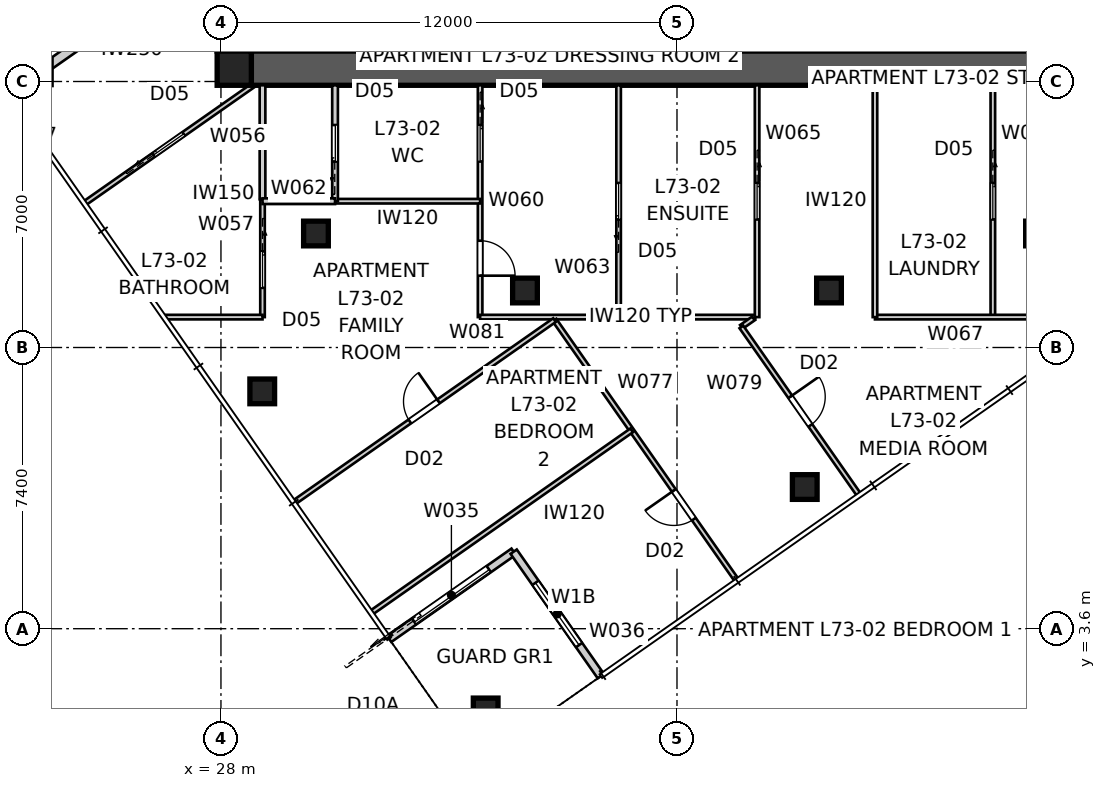
"""IFC4 building model, lengths in metres.
Left out: names, types, materials, properties, quantities, classifications, styles, units other than length and angle.
Written with IfcOpenShell. Run it as: python <this file> out.ifc"""

import sys

from ifc_helpers import new_model, si_unit, direction, frame, frame_2d, origin, origin_2d, place, context, subcontext, project, spatial, polyline, rectangle, outline, extrude, element, fill, save


model = new_model("IFC4")
c1 = context("Model", 3, precision=1e-05, world=origin(), true_north=direction((0.0, 1.0)))
c2 = subcontext(c1, "Body", "Model", "MODEL_VIEW")
j1 = project(units=[si_unit("LENGTHUNIT", "METRE"), si_unit("PLANEANGLEUNIT", "RADIAN")], contexts=[c1])
p1 = place(None, origin())
s1 = spatial("IfcSite", under=j1, at=p1, CompositionType="ELEMENT")
p2 = place(p1, origin())
s2 = spatial("IfcBuilding", under=s1, at=p2, CompositionType="ELEMENT")
p3 = place(p2, frame((0.0, 0.0, 264.2)))
s3 = spatial("IfcBuildingStorey", under=s2, at=p3, CompositionType="ELEMENT", Elevation=264.2)
p4 = place(p3, frame((51.2, 18.35, 0.0), z_axis=(0.0, 0.0, 1.0), x_axis=(-1.0, 0.0, 0.0)))
e1 = element("IfcWall", 1, at=p4, inside=s3, PredefinedType="SHEAR", context=c2, shape_type="SweptSolid", body=[
    extrude(outline(polyline([(0.0, -0.45), (22.4, -0.45), (22.4, -0.025), (22.85, -0.025), (22.85, 0.025), (22.4, 0.025), (22.4, 0.45), (0.0, 0.45), (0.0, 0.025), (-0.45, 0.025), (-0.45, -0.025), (0.0, -0.025), (0.0, -0.45)])), origin(), (0.0, 0.0, 1.0), 3.4),
])
p5 = place(p3, frame((28.35, 41.2, 0.0), z_axis=(0.0, 0.0, 1.0), x_axis=(0.0, -1.0, 0.0)))
e2 = element("IfcWall", 2, at=p5, inside=s3, PredefinedType="SHEAR", context=c2, shape_type="SweptSolid", body=[
    extrude(outline(polyline([(0.0, -0.45), (22.4, -0.45), (22.4, -0.025), (22.85, -0.025), (22.85, 0.025), (22.4, 0.025), (22.4, 0.45), (0.0, 0.45), (0.0, 0.025), (-0.45, 0.025), (-0.45, -0.025), (0.0, -0.025), (0.0, -0.45)])), origin(), (0.0, 0.0, 1.0), 3.4),
])
p6 = place(p5, frame((11.14, 0.0, 0.0)))
e3 = element("IfcOpeningElement", 3, at=p6, cuts=e2, PredefinedType="OPENING", context=c2, shape_type="SweptSolid", body=[
    extrude(rectangle(XDim=1.02, YDim=2.4, at=frame_2d((0.51, 1.2))), frame((0.0, 0.46, 0.0), z_axis=(0.0, -1.0, 0.0), x_axis=(1.0, 0.0, 0.0)), (0.0, 0.0, 1.0), 0.92),
])
p7 = place(p3, frame((28.35, 18.35, 0.0), z_axis=(0.0, 0.0, 1.0), x_axis=(1.0, 0.0, 0.0)))
e4 = element("IfcColumn", 4, at=p7, inside=s3, PredefinedType="COLUMN", context=c2, shape_type="SweptSolid", body=[
    extrude(rectangle(XDim=0.9, YDim=0.9, at=origin_2d()), origin(), (0.0, 0.0, 1.0), 3.4),
])
for number, where, z_axis, x_axis in (
    (5, (34.966, 1.449, 0.0), (0.0, 0.0, 1.0), (1.0, 0.0, 0.0)),
    (6, (43.362, 7.328, 0.0), (0.0, 0.0, 1.0), (1.0, 0.0, 0.0)),
    (7, (29.086, 9.845, 0.0), (0.0, 0.0, 1.0), (1.0, 0.0, 0.0)),
):
    element("IfcColumn", number, at=place(p3, frame(where, z_axis=z_axis, x_axis=x_axis)), inside=s3, PredefinedType="COLUMN", context=c2, shape_type="SweptSolid", body=[
        extrude(rectangle(XDim=0.65, YDim=0.65, at=origin_2d()), origin(), (0.0, 0.0, 1.0), 3.2),
    ])
for number, where, z_axis, x_axis in (
    (8, (30.5, 14.0, 0.0), (0.0, 0.0, 1.0), (1.0, 0.0, 0.0)),
    (9, (36.0, 12.5, 0.0), (0.0, 0.0, 1.0), (1.0, 0.0, 0.0)),
    (10, (44.0, 12.5, 0.0), (0.0, 0.0, 1.0), (1.0, 0.0, 0.0)),
    (11, (49.5, 14.0, 0.0), (0.0, 0.0, 1.0), (1.0, 0.0, 0.0)),
):
    element("IfcColumn", number, at=place(p3, frame(where, z_axis=z_axis, x_axis=x_axis)), inside=s3, PredefinedType="COLUMN", context=c2, shape_type="SweptSolid", body=[
        extrude(rectangle(XDim=0.65, YDim=0.65, at=origin_2d()), origin(), (0.0, 0.0, 1.0), 3.4),
    ])
p8 = place(p3, frame((32.426, 3.333, 0.0), z_axis=(0.0, 0.0, 1.0), x_axis=(0.819165963305, 0.573556557423, 0.0)))
e12 = element("IfcWall", 12, at=p8, inside=s3, PredefinedType="SOLIDWALL", context=c2, shape_type="SweptSolid", body=[
    extrude(rectangle(XDim=4.0, YDim=0.2, at=frame_2d((2.0, 0.0))), origin(), (0.0, 0.0, 1.0), 3.2),
])
p9 = place(p8, frame((0.8, 0.0, 0.0)))
e13 = element("IfcOpeningElement", 13, at=p9, cuts=e12, PredefinedType="OPENING", context=c2, shape_type="SweptSolid", body=[
    extrude(rectangle(XDim=2.4, YDim=2.1, at=frame_2d((1.2, 1.05))), frame((0.0, 0.11, 0.0), z_axis=(0.0, -1.0, 0.0), x_axis=(1.0, 0.0, 0.0)), (0.0, 0.0, 1.0), 0.22),
])
p10 = place(p3, frame((35.702, 5.627, 0.0), z_axis=(0.0, 0.0, 1.0), x_axis=(0.573597512525, -0.819137286189, 0.0)))
e14 = element("IfcWall", 14, at=p10, inside=s3, PredefinedType="SOLIDWALL", context=c2, shape_type="SweptSolid", body=[
    extrude(rectangle(XDim=4.0, YDim=0.2, at=frame_2d((2.0, 0.0))), origin(), (0.0, 0.0, 1.0), 3.2),
])
p11 = place(p10, frame((1.0, 0.0, 0.4)))
e15 = element("IfcOpeningElement", 15, at=p11, cuts=e14, PredefinedType="OPENING", context=c2, shape_type="SweptSolid", body=[
    extrude(rectangle(XDim=2.0, YDim=1.8, at=frame_2d((1.0, 0.9))), frame((0.0, 0.11, 0.0), z_axis=(0.0, -1.0, 0.0), x_axis=(1.0, 0.0, 0.0)), (0.0, 0.0, 1.0), 0.22),
])
p12 = place(p3, frame((22.388, 17.668, 0.0), z_axis=(0.0, 0.0, 1.0), x_axis=(0.819161528122, 0.573562891796, 0.0)))
e16 = element("IfcWall", 16, at=p12, inside=s3, PredefinedType="PARTITIONING", context=c2, shape_type="SweptSolid", body=[
    extrude(rectangle(XDim=6.681, YDim=0.25, at=frame_2d((3.341, 0.0))), origin(), (0.0, 0.0, 1.0), 3.2),
])
p13 = place(p3, frame((24.437, 14.812, 0.0), z_axis=(0.0, 0.0, 1.0), x_axis=(0.819157353031, 0.573568854608, 0.0)))
e17 = element("IfcWall", 17, at=p13, inside=s3, PredefinedType="PARTITIONING", context=c2, shape_type="SweptSolid", body=[
    extrude(rectangle(XDim=5.384, YDim=0.12, at=frame_2d((2.692, 0.0))), origin(), (0.0, 0.0, 1.0), 3.2),
])
p14 = place(p13, frame((2.192, 0.0, 0.0)))
e18 = element("IfcOpeningElement", 18, at=p14, cuts=e17, PredefinedType="OPENING", context=c2, shape_type="SweptSolid", body=[
    extrude(rectangle(XDim=0.96, YDim=2.1, at=frame_2d((0.48, 1.05))), frame((0.0, 0.07, 0.0), z_axis=(0.0, -1.0, 0.0), x_axis=(1.0, 0.0, 0.0)), (0.0, 0.0, 1.0), 0.14),
])
p15 = place(p3, frame((29.094, 14.9, 0.0), z_axis=(0.0, 0.0, 1.0), x_axis=(0.0, -1.0, 0.0)))
e19 = element("IfcWall", 19, at=p15, inside=s3, PredefinedType="PARTITIONING", context=c2, shape_type="SweptSolid", body=[
    extrude(rectangle(XDim=3.1, YDim=0.12, at=frame_2d((1.55, 0.0))), origin(), (0.0, 0.0, 1.0), 3.2),
])
p16 = place(p15, frame((1.37, 0.0, 0.0)))
e20 = element("IfcOpeningElement", 20, at=p16, cuts=e19, PredefinedType="OPENING", context=c2, shape_type="SweptSolid", body=[
    extrude(rectangle(XDim=0.96, YDim=2.1, at=frame_2d((0.48, 1.05))), frame((0.0, 0.07, 0.0), z_axis=(0.0, -1.0, 0.0), x_axis=(1.0, 0.0, 0.0)), (0.0, 0.0, 1.0), 0.14),
])
p17 = place(p3, frame((29.094, 11.8, 0.0), z_axis=(0.0, 0.0, 1.0), x_axis=(-1.0, 0.0, 0.0)))
e21 = element("IfcWall", 21, at=p17, inside=s3, PredefinedType="PARTITIONING", context=c2, shape_type="SweptSolid", body=[
    extrude(rectangle(XDim=2.548, YDim=0.12, at=frame_2d((1.274, 0.0))), origin(), (0.0, 0.0, 1.0), 3.2),
])
p18 = place(p3, frame((29.094, 17.9, 0.0), z_axis=(0.0, 0.0, 1.0), x_axis=(0.0, -1.0, 0.0)))
e22 = element("IfcWall", 22, at=p18, inside=s3, PredefinedType="SOLIDWALL", context=c2, shape_type="SweptSolid", body=[
    extrude(rectangle(XDim=3.0, YDim=0.15, at=frame_2d((1.5, 0.0))), origin(), (0.0, 0.0, 1.0), 3.2),
])
p19 = place(p3, frame((34.819, 17.9, 0.0), z_axis=(0.0, 0.0, 1.0), x_axis=(0.0, -1.0, 0.0)))
e23 = element("IfcWall", 23, at=p19, inside=s3, PredefinedType="PARTITIONING", context=c2, shape_type="SweptSolid", body=[
    extrude(rectangle(XDim=6.1, YDim=0.12, at=frame_2d((3.05, 0.0))), origin(), (0.0, 0.0, 1.0), 3.2),
])
p20 = place(p19, frame((4.09, 0.0, 0.0)))
e24 = element("IfcOpeningElement", 24, at=p20, cuts=e23, PredefinedType="OPENING", context=c2, shape_type="SweptSolid", body=[
    extrude(rectangle(XDim=0.92, YDim=2.1, at=frame_2d((0.46, 1.05))), frame((0.0, 0.07, 0.0), z_axis=(0.0, -1.0, 0.0), x_axis=(1.0, 0.0, 0.0)), (0.0, 0.0, 1.0), 0.14),
])
p21 = place(p19, frame((1.045, 0.0, 0.0)))
e25 = element("IfcOpeningElement", 25, at=p21, cuts=e23, PredefinedType="OPENING", context=c2, shape_type="SweptSolid", body=[
    extrude(rectangle(XDim=0.96, YDim=2.1, at=frame_2d((0.48, 1.05))), frame((0.0, 0.07, 0.0), z_axis=(0.0, -1.0, 0.0), x_axis=(1.0, 0.0, 0.0)), (0.0, 0.0, 1.0), 0.14),
])
p22 = place(p3, frame((34.819, 14.85, 0.0), z_axis=(0.0, 0.0, 1.0), x_axis=(-1.0, 0.0, 0.0)))
e26 = element("IfcWall", 26, at=p22, inside=s3, PredefinedType="PARTITIONING", context=c2, shape_type="SweptSolid", body=[
    extrude(rectangle(XDim=3.817, YDim=0.12, at=frame_2d((1.909, 0.0))), origin(), (0.0, 0.0, 1.0), 3.2),
])
p23 = place(p3, frame((31.002, 14.85, 0.0), z_axis=(0.0, 0.0, 1.0), x_axis=(0.0, 1.0, 0.0)))
e27 = element("IfcWall", 27, at=p23, inside=s3, PredefinedType="SOLIDWALL", context=c2, shape_type="SweptSolid", body=[
    extrude(rectangle(XDim=3.05, YDim=0.15, at=frame_2d((1.525, 0.0))), origin(), (0.0, 0.0, 1.0), 3.2),
])
p24 = place(p23, frame((1.045, 0.0, 0.0)))
e28 = element("IfcOpeningElement", 28, at=p24, cuts=e27, PredefinedType="OPENING", context=c2, shape_type="SweptSolid", body=[
    extrude(rectangle(XDim=0.96, YDim=2.1, at=frame_2d((0.48, 1.05))), frame((0.0, 0.085, 0.0), z_axis=(0.0, -1.0, 0.0), x_axis=(1.0, 0.0, 0.0)), (0.0, 0.0, 1.0), 0.17),
])
p25 = place(p3, frame((38.464, 11.8, 0.0), z_axis=(0.0, 0.0, 1.0), x_axis=(0.0, 1.0, 0.0)))
e29 = element("IfcWall", 29, at=p25, inside=s3, PredefinedType="PARTITIONING", context=c2, shape_type="SweptSolid", body=[
    extrude(rectangle(XDim=6.1, YDim=0.12, at=frame_2d((3.05, 0.0))), origin(), (0.0, 0.0, 1.0), 3.2),
])
p26 = place(p25, frame((2.57, 0.0, 0.0)))
e30 = element("IfcOpeningElement", 30, at=p26, cuts=e29, PredefinedType="OPENING", context=c2, shape_type="SweptSolid", body=[
    extrude(rectangle(XDim=0.96, YDim=2.1, at=frame_2d((0.48, 1.05))), frame((0.0, 0.07, 0.0), z_axis=(0.0, -1.0, 0.0), x_axis=(1.0, 0.0, 0.0)), (0.0, 0.0, 1.0), 0.14),
])
p27 = place(p3, frame((42.062, 11.8, 0.0), z_axis=(0.0, 0.0, 1.0), x_axis=(-1.0, 0.0, 0.0)))
e31 = element("IfcWall", 31, at=p27, inside=s3, PredefinedType="PARTITIONING", context=c2, shape_type="SweptSolid", body=[
    extrude(rectangle(XDim=7.243, YDim=0.12, at=frame_2d((3.621, 0.0))), origin(), (0.0, 0.0, 1.0), 3.2),
])
p28 = place(p3, frame((42.108, 17.9, 0.0), z_axis=(0.0, 0.0, 1.0), x_axis=(0.0, -1.0, 0.0)))
e32 = element("IfcWall", 32, at=p28, inside=s3, PredefinedType="PARTITIONING", context=c2, shape_type="SweptSolid", body=[
    extrude(rectangle(XDim=6.1, YDim=0.12, at=frame_2d((3.05, 0.0))), origin(), (0.0, 0.0, 1.0), 3.2),
])
p29 = place(p28, frame((2.57, 0.0, 0.0)))
e33 = element("IfcOpeningElement", 33, at=p29, cuts=e32, PredefinedType="OPENING", context=c2, shape_type="SweptSolid", body=[
    extrude(rectangle(XDim=0.96, YDim=2.1, at=frame_2d((0.48, 1.05))), frame((0.0, 0.07, 0.0), z_axis=(0.0, -1.0, 0.0), x_axis=(1.0, 0.0, 0.0)), (0.0, 0.0, 1.0), 0.14),
])
p30 = place(p3, frame((48.311, 17.9, 0.0), z_axis=(0.0, 0.0, 1.0), x_axis=(0.0, -1.0, 0.0)))
e34 = element("IfcWall", 34, at=p30, inside=s3, PredefinedType="PARTITIONING", context=c2, shape_type="SweptSolid", body=[
    extrude(rectangle(XDim=6.1, YDim=0.12, at=frame_2d((3.05, 0.0))), origin(), (0.0, 0.0, 1.0), 3.2),
])
p31 = place(p30, frame((2.57, 0.0, 0.0)))
e35 = element("IfcOpeningElement", 35, at=p31, cuts=e34, PredefinedType="OPENING", context=c2, shape_type="SweptSolid", body=[
    extrude(rectangle(XDim=0.96, YDim=2.1, at=frame_2d((0.48, 1.05))), frame((0.0, 0.07, 0.0), z_axis=(0.0, -1.0, 0.0), x_axis=(1.0, 0.0, 0.0)), (0.0, 0.0, 1.0), 0.14),
])
p32 = place(p3, frame((51.422, 11.8, 0.0), z_axis=(0.0, 0.0, 1.0), x_axis=(-1.0, 0.0, 0.0)))
e36 = element("IfcWall", 36, at=p32, inside=s3, PredefinedType="PARTITIONING", context=c2, shape_type="SweptSolid", body=[
    extrude(rectangle(XDim=6.213, YDim=0.12, at=frame_2d((3.106, 0.0))), origin(), (0.0, 0.0, 1.0), 3.2),
])
p33 = place(p32, frame((1.061, 0.0, 0.0)))
e37 = element("IfcOpeningElement", 37, at=p33, cuts=e36, PredefinedType="OPENING", context=c2, shape_type="SweptSolid", body=[
    extrude(rectangle(XDim=0.92, YDim=2.1, at=frame_2d((0.46, 1.05))), frame((0.0, 0.07, 0.0), z_axis=(0.0, -1.0, 0.0), x_axis=(1.0, 0.0, 0.0)), (0.0, 0.0, 1.0), 0.14),
])
p34 = place(p3, frame((45.209, 11.8, 0.0), z_axis=(0.0, 0.0, 1.0), x_axis=(0.0, 1.0, 0.0)))
e38 = element("IfcWall", 38, at=p34, inside=s3, PredefinedType="PARTITIONING", context=c2, shape_type="SweptSolid", body=[
    extrude(rectangle(XDim=6.1, YDim=0.12, at=frame_2d((3.05, 0.0))), origin(), (0.0, 0.0, 1.0), 3.2),
])
p35 = place(p3, frame((41.558, 4.893, 0.0), z_axis=(0.0, 0.0, 1.0), x_axis=(-0.573576357466, 0.819152099525, 0.0)))
e39 = element("IfcWall", 39, at=p35, inside=s3, PredefinedType="PARTITIONING", context=c2, shape_type="SweptSolid", body=[
    extrude(rectangle(XDim=8.335, YDim=0.12, at=frame_2d((4.167, 0.0))), origin(), (0.0, 0.0, 1.0), 3.2),
])
p36 = place(p35, frame((1.942, 0.0, 0.0)))
e40 = element("IfcOpeningElement", 40, at=p36, cuts=e39, PredefinedType="OPENING", context=c2, shape_type="SweptSolid", body=[
    extrude(rectangle(XDim=0.92, YDim=2.34, at=frame_2d((0.46, 1.17))), frame((0.0, 0.07, 0.0), z_axis=(0.0, -1.0, 0.0), x_axis=(1.0, 0.0, 0.0)), (0.0, 0.0, 1.0), 0.14),
])
p37 = place(p3, frame((42.012, 11.765, 0.0), z_axis=(0.0, 0.0, 1.0), x_axis=(-0.819379381292, -0.573251628444, 0.0)))
e41 = element("IfcWall", 41, at=p37, inside=s3, PredefinedType="PARTITIONING", context=c2, shape_type="SweptSolid", body=[
    extrude(rectangle(XDim=0.389, YDim=0.12, at=frame_2d((0.194, 0.0))), origin(), (0.0, 0.0, 1.0), 3.2),
])
p38 = place(p3, frame((41.693, 11.542, 0.0), z_axis=(0.0, 0.0, 1.0), x_axis=(0.573560001964, -0.819163551525, 0.0)))
e42 = element("IfcWall", 42, at=p38, inside=s3, PredefinedType="PARTITIONING", context=c2, shape_type="SweptSolid", body=[
    extrude(rectangle(XDim=5.369, YDim=0.12, at=frame_2d((2.685, 0.0))), origin(), (0.0, 0.0, 1.0), 3.2),
])
p39 = place(p38, frame((2.244, 0.0, 0.0)))
e43 = element("IfcOpeningElement", 43, at=p39, cuts=e42, PredefinedType="OPENING", context=c2, shape_type="SweptSolid", body=[
    extrude(rectangle(XDim=0.92, YDim=2.34, at=frame_2d((0.46, 1.17))), frame((0.0, 0.07, 0.0), z_axis=(0.0, -1.0, 0.0), x_axis=(1.0, 0.0, 0.0)), (0.0, 0.0, 1.0), 0.14),
])
p40 = place(p3, frame((38.808, 8.82, 0.0), z_axis=(0.0, 0.0, 1.0), x_axis=(-0.819152099525, -0.573576357466, 0.0)))
e44 = element("IfcWall", 44, at=p40, inside=s3, PredefinedType="PARTITIONING", context=c2, shape_type="SweptSolid", body=[
    extrude(rectangle(XDim=8.335, YDim=0.12, at=frame_2d((4.167, 0.0))), origin(), (0.0, 0.0, 1.0), 3.2),
])
p41 = place(p3, frame((29.949, 6.94, 0.0), z_axis=(0.0, 0.0, 1.0), x_axis=(0.819152099525, 0.573576357466, 0.0)))
e45 = element("IfcWall", 45, at=p41, inside=s3, PredefinedType="PARTITIONING", context=c2, shape_type="SweptSolid", body=[
    extrude(rectangle(XDim=8.335, YDim=0.12, at=frame_2d((4.167, 0.0))), origin(), (0.0, 0.0, 1.0), 3.2),
])
p42 = place(p41, frame((3.688, 0.0, 0.0)))
e46 = element("IfcOpeningElement", 46, at=p42, cuts=e45, PredefinedType="OPENING", context=c2, shape_type="SweptSolid", body=[
    extrude(rectangle(XDim=0.92, YDim=2.34, at=frame_2d((0.46, 1.17))), frame((0.0, 0.07, 0.0), z_axis=(0.0, -1.0, 0.0), x_axis=(1.0, 0.0, 0.0)), (0.0, 0.0, 1.0), 0.14),
])
p43 = place(p3, frame((29.094, 14.85, 0.0), z_axis=(0.0, 0.0, 1.0), x_axis=(1.0, 0.0, 0.0)))
e47 = element("IfcWall", 47, at=p43, inside=s3, PredefinedType="SOLIDWALL", context=c2, shape_type="SweptSolid", body=[
    extrude(rectangle(XDim=1.909, YDim=0.15, at=frame_2d((0.954, 0.0))), origin(), (0.0, 0.0, 1.0), 3.2),
])
p44 = place(p9, origin())
e48 = element("IfcDoor", 48, at=p44, inside=s3, OperationType="SLIDING_TO_LEFT", PredefinedType="DOOR", context=c2, shape_type="SweptSolid", body=[
    extrude(rectangle(XDim=2.4, YDim=2.1, at=frame_2d((1.2, 1.05))), frame((0.0, 0.025, 0.0), z_axis=(0.0, -1.0, 0.0), x_axis=(1.0, 0.0, 0.0)), (0.0, 0.0, 1.0), 0.05),
])
fill(e13, e48)
p45 = place(p11, origin())
e49 = element("IfcWindow", 49, at=p45, inside=s3, PartitioningType="SINGLE_PANEL", PredefinedType="WINDOW", context=c2, shape_type="SweptSolid", body=[
    extrude(rectangle(XDim=2.0, YDim=1.8, at=frame_2d((1.0, 0.9))), frame((0.0, 0.03, 0.0), z_axis=(0.0, -1.0, 0.0), x_axis=(1.0, 0.0, 0.0)), (0.0, 0.0, 1.0), 0.06),
])
fill(e15, e49)
p46 = place(p31, origin())
e50 = element("IfcDoor", 50, at=p46, inside=s3, OperationType="SLIDING_TO_LEFT", PredefinedType="DOOR", context=c2, shape_type="SweptSolid", body=[
    extrude(rectangle(XDim=0.96, YDim=2.1, at=frame_2d((0.48, 1.05))), frame((0.0, 0.025, 0.0), z_axis=(0.0, -1.0, 0.0), x_axis=(1.0, 0.0, 0.0)), (0.0, 0.0, 1.0), 0.05),
])
fill(e35, e50)
p47 = place(p29, origin())
e51 = element("IfcDoor", 51, at=p47, inside=s3, OperationType="SLIDING_TO_LEFT", PredefinedType="DOOR", context=c2, shape_type="SweptSolid", body=[
    extrude(rectangle(XDim=0.96, YDim=2.1, at=frame_2d((0.48, 1.05))), frame((0.0, 0.025, 0.0), z_axis=(0.0, -1.0, 0.0), x_axis=(1.0, 0.0, 0.0)), (0.0, 0.0, 1.0), 0.05),
])
fill(e33, e51)
p48 = place(p39, origin())
e52 = element("IfcDoor", 52, at=p48, inside=s3, OperationType="SINGLE_SWING_LEFT", PredefinedType="DOOR", context=c2, shape_type="SweptSolid", body=[
    extrude(rectangle(XDim=0.92, YDim=2.34, at=frame_2d((0.46, 1.17))), frame((0.0, 0.025, 0.0), z_axis=(0.0, -1.0, 0.0), x_axis=(1.0, 0.0, 0.0)), (0.0, 0.0, 1.0), 0.05),
])
fill(e43, e52)
p49 = place(p26, origin())
e53 = element("IfcDoor", 53, at=p49, inside=s3, OperationType="SLIDING_TO_LEFT", PredefinedType="DOOR", context=c2, shape_type="SweptSolid", body=[
    extrude(rectangle(XDim=0.96, YDim=2.1, at=frame_2d((0.48, 1.05))), frame((0.0, 0.025, 0.0), z_axis=(0.0, -1.0, 0.0), x_axis=(1.0, 0.0, 0.0)), (0.0, 0.0, 1.0), 0.05),
])
fill(e30, e53)
p50 = place(p20, origin())
e54 = element("IfcDoor", 54, at=p50, inside=s3, OperationType="SINGLE_SWING_RIGHT", PredefinedType="DOOR", context=c2, shape_type="SweptSolid", body=[
    extrude(rectangle(XDim=0.92, YDim=2.1, at=frame_2d((0.46, 1.05))), frame((0.0, 0.025, 0.0), z_axis=(0.0, -1.0, 0.0), x_axis=(1.0, 0.0, 0.0)), (0.0, 0.0, 1.0), 0.05),
])
fill(e24, e54)
p51 = place(p21, origin())
e55 = element("IfcDoor", 55, at=p51, inside=s3, OperationType="SLIDING_TO_LEFT", PredefinedType="DOOR", context=c2, shape_type="SweptSolid", body=[
    extrude(rectangle(XDim=0.96, YDim=2.1, at=frame_2d((0.48, 1.05))), frame((0.0, 0.025, 0.0), z_axis=(0.0, -1.0, 0.0), x_axis=(1.0, 0.0, 0.0)), (0.0, 0.0, 1.0), 0.05),
])
fill(e25, e55)
p52 = place(p42, origin())
e56 = element("IfcDoor", 56, at=p52, inside=s3, OperationType="SINGLE_SWING_RIGHT", PredefinedType="DOOR", context=c2, shape_type="SweptSolid", body=[
    extrude(rectangle(XDim=0.92, YDim=2.34, at=frame_2d((0.46, 1.17))), frame((0.0, 0.025, 0.0), z_axis=(0.0, -1.0, 0.0), x_axis=(1.0, 0.0, 0.0)), (0.0, 0.0, 1.0), 0.05),
])
fill(e46, e56)
p53 = place(p16, origin())
e57 = element("IfcDoor", 57, at=p53, inside=s3, OperationType="SLIDING_TO_LEFT", PredefinedType="DOOR", context=c2, shape_type="SweptSolid", body=[
    extrude(rectangle(XDim=0.96, YDim=2.1, at=frame_2d((0.48, 1.05))), frame((0.0, 0.025, 0.0), z_axis=(0.0, -1.0, 0.0), x_axis=(1.0, 0.0, 0.0)), (0.0, 0.0, 1.0), 0.05),
])
fill(e20, e57)
p54 = place(p24, origin())
e58 = element("IfcDoor", 58, at=p54, inside=s3, OperationType="SLIDING_TO_LEFT", PredefinedType="DOOR", context=c2, shape_type="SweptSolid", body=[
    extrude(rectangle(XDim=0.96, YDim=2.1, at=frame_2d((0.48, 1.05))), frame((0.0, 0.025, 0.0), z_axis=(0.0, -1.0, 0.0), x_axis=(1.0, 0.0, 0.0)), (0.0, 0.0, 1.0), 0.05),
])
fill(e28, e58)
p55 = place(p14, origin())
e59 = element("IfcDoor", 59, at=p55, inside=s3, OperationType="SLIDING_TO_LEFT", PredefinedType="DOOR", context=c2, shape_type="SweptSolid", body=[
    extrude(rectangle(XDim=0.96, YDim=2.1, at=frame_2d((0.48, 1.05))), frame((0.0, 0.025, 0.0), z_axis=(0.0, -1.0, 0.0), x_axis=(1.0, 0.0, 0.0)), (0.0, 0.0, 1.0), 0.05),
])
fill(e18, e59)
p56 = place(p36, origin())
e60 = element("IfcDoor", 60, at=p56, inside=s3, OperationType="SINGLE_SWING_RIGHT", PredefinedType="DOOR", context=c2, shape_type="SweptSolid", body=[
    extrude(rectangle(XDim=0.92, YDim=2.34, at=frame_2d((0.46, 1.17))), frame((0.0, 0.025, 0.0), z_axis=(0.0, -1.0, 0.0), x_axis=(1.0, 0.0, 0.0)), (0.0, 0.0, 1.0), 0.05),
])
fill(e40, e60)
save(model, sys.argv[1])
